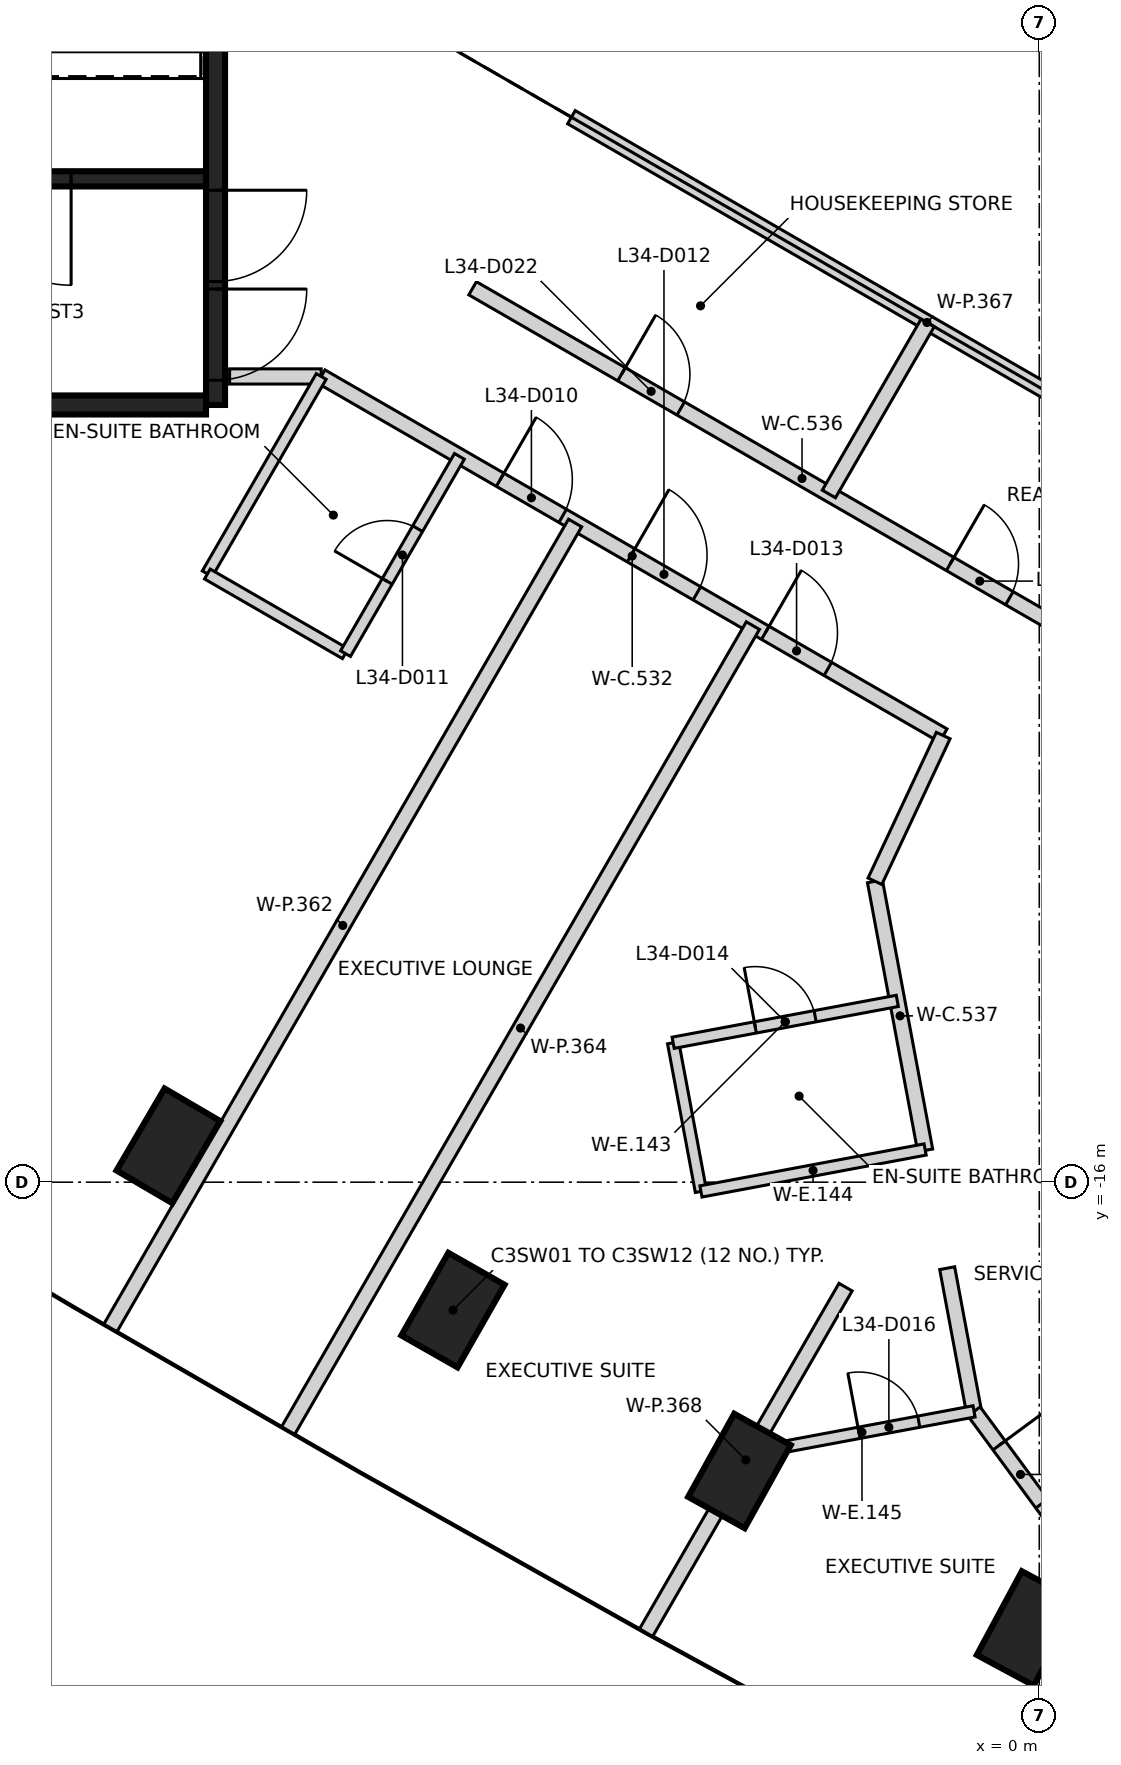
"""IFC4 building model, lengths in metres.
Left out: names, types, materials, properties, quantities, classifications, styles, units other than length and angle.
Written with IfcOpenShell. Run it as: python <this file> out.ifc"""

import sys

from ifc_helpers import new_model, si_unit, direction, frame, frame_2d, origin, origin_2d, place, context, subcontext, project, spatial, rectangle, extrude, element, fill, save


model = new_model("IFC4")
c1 = context("Model", 3, precision=1e-05, world=origin(), true_north=direction((0.0, 1.0)))
c2 = subcontext(c1, "Body", "Model", "MODEL_VIEW")
j1 = project(units=[si_unit("LENGTHUNIT", "METRE"), si_unit("PLANEANGLEUNIT", "RADIAN")], contexts=[c1])
p1 = place(None, origin())
s1 = spatial("IfcSite", under=j1, at=p1, CompositionType="ELEMENT")
p2 = place(p1, origin())
s2 = spatial("IfcBuilding", under=s1, at=p2, CompositionType="ELEMENT")
p3 = place(p2, frame((0.0, 0.0, 139.6)))
s3 = spatial("IfcBuildingStorey", under=s2, at=p3, CompositionType="ELEMENT", Elevation=139.6)
for number, where, z_axis, x_axis in (
    (1, (-11.457, -15.522, -0.4), (0.0, 0.0, 1.0), (0.505, 0.863, 0.0)),
    (2, (-7.714, -17.683, -0.4), (0.0, 0.0, 1.0), (0.495, 0.869, 0.0)),
    (3, (-3.945, -19.8, -0.4), (0.0, 0.0, 1.0), (0.485, 0.875, 0.0)),
    (4, (-0.151, -21.871, -0.4), (0.0, 0.0, 1.0), (0.474, 0.881, 0.0)),
):
    element("IfcColumn", number, at=place(p3, frame(where, z_axis=z_axis, x_axis=x_axis)), inside=s3, PredefinedType="COLUMN", context=c2, shape_type="SweptSolid", body=[
        extrude(rectangle(XDim=1.25, YDim=0.85, at=origin_2d()), origin(), (0.0, 0.0, 1.0), 3.6),
    ])
p4 = place(p3, frame((-10.837, 5.775, 0.0), z_axis=(0.0, 0.0, 1.0), x_axis=(0.0, -1.0, 0.0)))
e5 = element("IfcWall", 5, at=p4, inside=s3, PredefinedType="SHEAR", context=c2, shape_type="SweptSolid", body=[
    extrude(rectangle(XDim=11.55, YDim=0.25, at=frame_2d((5.775, 0.0))), origin(), (0.0, 0.0, 1.0), 3.2),
])
p5 = place(p4, frame((10.025, 0.0, 0.0)))
e6 = element("IfcOpeningElement", 6, at=p5, cuts=e5, PredefinedType="OPENING", context=c2, shape_type="SweptSolid", body=[
    extrude(rectangle(XDim=1.2, YDim=2.1, at=frame_2d((0.6, 1.05))), frame((0.0, 0.135, 0.0), z_axis=(0.0, -1.0, 0.0), x_axis=(1.0, 0.0, 0.0)), (0.0, 0.0, 1.0), 0.27),
])
p6 = place(p4, frame((8.725, 0.0, 0.0)))
e7 = element("IfcOpeningElement", 7, at=p6, cuts=e5, PredefinedType="OPENING", context=c2, shape_type="SweptSolid", body=[
    extrude(rectangle(XDim=1.2, YDim=2.1, at=frame_2d((0.6, 1.05))), frame((0.0, 0.135, 0.0), z_axis=(0.0, -1.0, 0.0), x_axis=(1.0, 0.0, 0.0)), (0.0, 0.0, 1.0), 0.27),
])
p7 = place(p3, frame((-10.963, -5.775, 0.0), z_axis=(0.0, 0.0, 1.0), x_axis=(-1.0, 0.0, 0.0)))
e8 = element("IfcWall", 8, at=p7, inside=s3, PredefinedType="SHEAR", context=c2, shape_type="SweptSolid", body=[
    extrude(rectangle(XDim=5.225, YDim=0.25, at=frame_2d((2.612, 0.0))), origin(), (0.0, 0.0, 1.0), 3.2),
])
p8 = place(p3, frame((-10.963, -2.8, 0.0), z_axis=(0.0, 0.0, 1.0), x_axis=(-1.0, 0.0, 0.0)))
e9 = element("IfcWall", 9, at=p8, inside=s3, PredefinedType="SHEAR", context=c2, shape_type="SweptSolid", body=[
    extrude(rectangle(XDim=5.098, YDim=0.2, at=frame_2d((2.549, 0.0))), origin(), (0.0, 0.0, 1.0), 3.2),
])
p9 = place(p8, frame((1.774, 0.0, 0.0)))
e10 = element("IfcOpeningElement", 10, at=p9, cuts=e9, PredefinedType="OPENING", context=c2, shape_type="SweptSolid", body=[
    extrude(rectangle(XDim=1.4, YDim=2.1, at=frame_2d((0.7, 1.05))), frame((0.0, 0.11, 0.0), z_axis=(0.0, -1.0, 0.0), x_axis=(1.0, 0.0, 0.0)), (0.0, 0.0, 1.0), 0.22),
])
p10 = place(p3, frame((-10.652, -5.4, 0.0), z_axis=(0.0, 0.0, 1.0), x_axis=(1.0, 0.0, 0.0)))
e11 = element("IfcWall", 11, at=p10, inside=s3, PredefinedType="PARTITIONING", context=c2, shape_type="SweptSolid", body=[
    extrude(rectangle(XDim=1.205, YDim=0.2, at=frame_2d((0.603, 0.0))), origin(), (0.0, 0.0, 1.0), 3.2),
])
p11 = place(p3, frame((-9.447, -5.4, 0.0), z_axis=(0.0, 0.0, 1.0), x_axis=(0.866101262146, -0.49986858644, 0.0)))
e12 = element("IfcWall", 12, at=p11, inside=s3, PredefinedType="PARTITIONING", context=c2, shape_type="SweptSolid", body=[
    extrude(rectangle(XDim=9.449, YDim=0.2, at=frame_2d((4.724, 0.0))), origin(), (0.0, 0.0, 1.0), 3.2),
])
p12 = place(p11, frame((2.718, 0.0, 0.0)))
e13 = element("IfcOpeningElement", 13, at=p12, cuts=e12, PredefinedType="OPENING", context=c2, shape_type="SweptSolid", body=[
    extrude(rectangle(XDim=0.95, YDim=2.1, at=frame_2d((0.475, 1.05))), frame((0.0, 0.11, 0.0), z_axis=(0.0, -1.0, 0.0), x_axis=(1.0, 0.0, 0.0)), (0.0, 0.0, 1.0), 0.22),
])
p13 = place(p11, frame((4.707, 0.0, 0.0)))
e14 = element("IfcOpeningElement", 14, at=p13, cuts=e12, PredefinedType="OPENING", context=c2, shape_type="SweptSolid", body=[
    extrude(rectangle(XDim=1.0, YDim=2.1, at=frame_2d((0.5, 1.05))), frame((0.0, 0.11, 0.0), z_axis=(0.0, -1.0, 0.0), x_axis=(1.0, 0.0, 0.0)), (0.0, 0.0, 1.0), 0.22),
])
p14 = place(p11, frame((6.746, 0.0, 0.0)))
e15 = element("IfcOpeningElement", 15, at=p14, cuts=e12, PredefinedType="OPENING", context=c2, shape_type="SweptSolid", body=[
    extrude(rectangle(XDim=0.95, YDim=2.1, at=frame_2d((0.475, 1.05))), frame((0.0, 0.11, 0.0), z_axis=(0.0, -1.0, 0.0), x_axis=(1.0, 0.0, 0.0)), (0.0, 0.0, 1.0), 0.22),
])
p15 = place(p3, frame((-7.455, -4.24, 0.0), z_axis=(0.0, 0.0, 1.0), x_axis=(0.866015783746, -0.500016662025, 0.0)))
e16 = element("IfcWall", 16, at=p15, inside=s3, PredefinedType="PARTITIONING", context=c2, shape_type="SweptSolid", body=[
    extrude(rectangle(XDim=10.009, YDim=0.2, at=frame_2d((5.004, 0.0))), origin(), (0.0, 0.0, 1.0), 3.2),
])
p16 = place(p15, frame((2.262, 0.0, 0.0)))
e17 = element("IfcOpeningElement", 17, at=p16, cuts=e16, PredefinedType="OPENING", context=c2, shape_type="SweptSolid", body=[
    extrude(rectangle(XDim=0.9, YDim=2.1, at=frame_2d((0.45, 1.05))), frame((0.0, 0.11, 0.0), z_axis=(0.0, -1.0, 0.0), x_axis=(1.0, 0.0, 0.0)), (0.0, 0.0, 1.0), 0.22),
])
p17 = place(p15, frame((7.254, 0.0, 0.0)))
e18 = element("IfcOpeningElement", 18, at=p17, cuts=e16, PredefinedType="OPENING", context=c2, shape_type="SweptSolid", body=[
    extrude(rectangle(XDim=0.9, YDim=2.1, at=frame_2d((0.45, 1.05))), frame((0.0, 0.11, 0.0), z_axis=(0.0, -1.0, 0.0), x_axis=(1.0, 0.0, 0.0)), (0.0, 0.0, 1.0), 0.22),
])
p18 = place(p3, frame((-2.162, -12.042, 0.0), z_axis=(0.0, 0.0, 1.0), x_axis=(0.183572226488, -0.983006224631, 0.0)))
e19 = element("IfcWall", 19, at=p18, inside=s3, PredefinedType="PARTITIONING", context=c2, shape_type="SweptSolid", body=[
    extrude(rectangle(XDim=3.602, YDim=0.2, at=frame_2d((1.801, 0.0))), origin(), (0.0, 0.0, 1.0), 3.2),
])
p19 = place(p3, frame((-2.162, -12.041, 0.0), z_axis=(0.0, 0.0, 1.0), x_axis=(0.424280226728, 0.905530943264, 0.0)))
e20 = element("IfcWall", 20, at=p19, inside=s3, PredefinedType="PARTITIONING", context=c2, shape_type="SweptSolid", body=[
    extrude(rectangle(XDim=2.117, YDim=0.2, at=frame_2d((1.059, 0.0))), origin(), (0.0, 0.0, 1.0), 3.2),
])
p20 = place(p3, frame((-1.212, -17.131, 0.0), z_axis=(0.0, 0.0, 1.0), x_axis=(0.183680924698, -0.982985919483, 0.0)))
e21 = element("IfcWall", 21, at=p20, inside=s3, PredefinedType="PARTITIONING", context=c2, shape_type="SweptSolid", body=[
    extrude(rectangle(XDim=1.917, YDim=0.2, at=frame_2d((0.958, 0.0))), origin(), (0.0, 0.0, 1.0), 3.2),
])
p21 = place(p3, frame((-0.858, -19.016, 0.0), z_axis=(0.0, 0.0, 1.0), x_axis=(0.593123867414, -0.805111220829, 0.0)))
e22 = element("IfcWall", 22, at=p21, inside=s3, PredefinedType="PARTITIONING", context=c2, shape_type="SweptSolid", body=[
    extrude(rectangle(XDim=2.77, YDim=0.2, at=frame_2d((1.385, 0.0))), origin(), (0.0, 0.0, 1.0), 3.2),
])
p22 = place(p21, frame((0.555, 0.0, 0.0)))
e23 = element("IfcOpeningElement", 23, at=p22, cuts=e22, PredefinedType="OPENING", context=c2, shape_type="SweptSolid", body=[
    extrude(rectangle(XDim=0.95, YDim=2.1, at=frame_2d((0.475, 1.05))), frame((0.0, 0.11, 0.0), z_axis=(0.0, -1.0, 0.0), x_axis=(1.0, 0.0, 0.0)), (0.0, 0.0, 1.0), 0.22),
])
p23 = place(p3, frame((-12.22, -17.917, 0.0), z_axis=(0.0, 0.0, 1.0), x_axis=(0.499963860175, 0.866046268117, 0.0)))
e24 = element("IfcWall", 24, at=p23, inside=s3, PredefinedType="PARTITIONING", context=c2, shape_type="SweptSolid", body=[
    extrude(rectangle(XDim=12.227, YDim=0.2, at=frame_2d((6.114, 0.0))), origin(), (0.0, 0.0, 1.0), 2.3),
])
p24 = place(p3, frame((-9.882, -19.267, 0.0), z_axis=(0.0, 0.0, 1.0), x_axis=(0.499993811829, 0.866028976497, 0.0)))
e25 = element("IfcWall", 25, at=p24, inside=s3, PredefinedType="PARTITIONING", context=c2, shape_type="SweptSolid", body=[
    extrude(rectangle(XDim=12.227, YDim=0.2, at=frame_2d((6.114, 0.0))), origin(), (0.0, 0.0, 1.0), 2.3),
])
p25 = place(p3, frame((-6.155, -1.989, 0.0), z_axis=(0.0, 0.0, 1.0), x_axis=(0.866009062299, -0.500028303215, 0.0)))
e26 = element("IfcWall", 26, at=p25, inside=s3, PredefinedType="PARTITIONING", context=c2, shape_type="SweptSolid", body=[
    extrude(rectangle(XDim=10.802, YDim=0.2, at=frame_2d((5.401, 0.0))), origin(), (0.0, 0.0, 1.0), 2.3),
])
p26 = place(p3, frame((-5.173, -21.926, 0.0), z_axis=(0.0, 0.0, 1.0), x_axis=(0.499941227542, 0.86605933342, 0.0)))
e27 = element("IfcWall", 27, at=p26, inside=s3, PredefinedType="PARTITIONING", context=c2, shape_type="SweptSolid", body=[
    extrude(rectangle(XDim=5.249, YDim=0.2, at=frame_2d((2.625, 0.0))), origin(), (0.0, 0.0, 1.0), 3.2),
])
p27 = place(p3, frame((-2.768, -6.946, 0.0), z_axis=(0.0, 0.0, 1.0), x_axis=(0.500017832597, 0.866015107885, 0.0)))
e28 = element("IfcWall", 28, at=p27, inside=s3, PredefinedType="PARTITIONING", context=c2, shape_type="SweptSolid", body=[
    extrude(rectangle(XDim=2.6, YDim=0.2, at=frame_2d((1.3, 0.0))), origin(), (0.0, 0.0, 1.0), 2.3),
])
p28 = place(p3, frame((-0.425, -24.505, 0.0), z_axis=(0.0, 0.0, 1.0), x_axis=(0.499915194772, 0.86607436057, 0.0)))
e29 = element("IfcWall", 29, at=p28, inside=s3, PredefinedType="PARTITIONING", context=c2, shape_type="SweptSolid", body=[
    extrude(rectangle(XDim=2.997, YDim=0.2, at=frame_2d((1.499, 0.0))), origin(), (0.0, 0.0, 1.0), 2.3),
])
p29 = place(p3, frame((-10.946, -7.996, 0.0), z_axis=(0.0, 0.0, 1.0), x_axis=(0.500027927039, 0.866009279501, 0.0)))
e30 = element("IfcWall", 30, at=p29, inside=s3, PredefinedType="PARTITIONING", context=c2, shape_type="SweptSolid", body=[
    extrude(rectangle(XDim=2.998, YDim=0.15, at=frame_2d((1.499, 0.0))), origin(), (0.0, 0.0, 1.0), 3.2),
])
p30 = place(p3, frame((-10.945, -7.999, 0.0), z_axis=(0.0, 0.0, 1.0), x_axis=(0.866005190944, -0.500035008033, 0.0)))
e31 = element("IfcWall", 31, at=p30, inside=s3, PredefinedType="PARTITIONING", context=c2, shape_type="SweptSolid", body=[
    extrude(rectangle(XDim=2.096, YDim=0.15, at=frame_2d((1.048, 0.0))), origin(), (0.0, 0.0, 1.0), 3.2),
])
p31 = place(p3, frame((-9.127, -9.046, 0.0), z_axis=(0.0, 0.0, 1.0), x_axis=(0.499959910729, 0.866048548099, 0.0)))
e32 = element("IfcWall", 32, at=p31, inside=s3, PredefinedType="PARTITIONING", context=c2, shape_type="SweptSolid", body=[
    extrude(rectangle(XDim=2.996, YDim=0.15, at=frame_2d((1.498, 0.0))), origin(), (0.0, 0.0, 1.0), 3.2),
])
p32 = place(p31, frame((1.098, 0.0, 0.0)))
e33 = element("IfcOpeningElement", 33, at=p32, cuts=e32, PredefinedType="OPENING", context=c2, shape_type="SweptSolid", body=[
    extrude(rectangle(XDim=0.8, YDim=2.1, at=frame_2d((0.4, 1.05))), frame((0.0, 0.085, 0.0), z_axis=(0.0, -1.0, 0.0), x_axis=(1.0, 0.0, 0.0)), (0.0, 0.0, 1.0), 0.17),
])
p33 = place(p3, frame((-4.817, -14.166, 0.0), z_axis=(0.0, 0.0, 1.0), x_axis=(0.183903339385, -0.982944332993, 0.0)))
e34 = element("IfcWall", 34, at=p33, inside=s3, PredefinedType="PARTITIONING", context=c2, shape_type="SweptSolid", body=[
    extrude(rectangle(XDim=1.99, YDim=0.15, at=frame_2d((0.995, 0.0))), origin(), (0.0, 0.0, 1.0), 3.2),
])
p34 = place(p3, frame((-4.817, -14.166, 0.0), z_axis=(0.0, 0.0, 1.0), x_axis=(0.982987155193, 0.183674311555, 0.0)))
e35 = element("IfcWall", 35, at=p34, inside=s3, PredefinedType="PARTITIONING", context=c2, shape_type="SweptSolid", body=[
    extrude(rectangle(XDim=3.0, YDim=0.15, at=frame_2d((1.5, 0.0))), origin(), (0.0, 0.0, 1.0), 3.2),
])
p35 = place(p34, frame((1.1, 0.0, 0.0)))
e36 = element("IfcOpeningElement", 36, at=p35, cuts=e35, PredefinedType="OPENING", context=c2, shape_type="SweptSolid", body=[
    extrude(rectangle(XDim=0.8, YDim=2.1, at=frame_2d((0.4, 1.05))), frame((0.0, 0.085, 0.0), z_axis=(0.0, -1.0, 0.0), x_axis=(1.0, 0.0, 0.0)), (0.0, 0.0, 1.0), 0.17),
])
p36 = place(p3, frame((-4.451, -16.122, 0.0), z_axis=(0.0, 0.0, 1.0), x_axis=(0.982928336035, 0.18398882091, 0.0)))
e37 = element("IfcWall", 37, at=p36, inside=s3, PredefinedType="PARTITIONING", context=c2, shape_type="SweptSolid", body=[
    extrude(rectangle(XDim=3.0, YDim=0.15, at=frame_2d((1.5, 0.0))), origin(), (0.0, 0.0, 1.0), 3.2),
])
p37 = place(p3, frame((-3.807, -19.566, 0.0), z_axis=(0.0, 0.0, 1.0), x_axis=(0.982987155193, 0.183674311555, 0.0)))
e38 = element("IfcWall", 38, at=p37, inside=s3, PredefinedType="PARTITIONING", context=c2, shape_type="SweptSolid", body=[
    extrude(rectangle(XDim=3.0, YDim=0.15, at=frame_2d((1.5, 0.0))), origin(), (0.0, 0.0, 1.0), 3.2),
])
p38 = place(p37, frame((1.46, 0.0, 0.0)))
e39 = element("IfcOpeningElement", 39, at=p38, cuts=e38, PredefinedType="OPENING", context=c2, shape_type="SweptSolid", body=[
    extrude(rectangle(XDim=0.8, YDim=2.1, at=frame_2d((0.4, 1.05))), frame((0.0, 0.085, 0.0), z_axis=(0.0, -1.0, 0.0), x_axis=(1.0, 0.0, 0.0)), (0.0, 0.0, 1.0), 0.17),
])
p39 = place(p5, origin())
e40 = element("IfcDoor", 40, at=p39, inside=s3, OperationType="SINGLE_SWING_LEFT", PredefinedType="DOOR", context=c2, shape_type="SweptSolid", body=[
    extrude(rectangle(XDim=1.2, YDim=2.1, at=frame_2d((0.6, 1.05))), frame((0.0, 0.025, 0.0), z_axis=(0.0, -1.0, 0.0), x_axis=(1.0, 0.0, 0.0)), (0.0, 0.0, 1.0), 0.05),
])
fill(e6, e40)
p40 = place(p6, origin())
e41 = element("IfcDoor", 41, at=p40, inside=s3, OperationType="SINGLE_SWING_RIGHT", PredefinedType="DOOR", context=c2, shape_type="SweptSolid", body=[
    extrude(rectangle(XDim=1.2, YDim=2.1, at=frame_2d((0.6, 1.05))), frame((0.0, 0.025, 0.0), z_axis=(0.0, -1.0, 0.0), x_axis=(1.0, 0.0, 0.0)), (0.0, 0.0, 1.0), 0.05),
])
fill(e7, e41)
p41 = place(p9, origin())
e42 = element("IfcDoor", 42, at=p41, inside=s3, OperationType="SINGLE_SWING_RIGHT", PredefinedType="DOOR", context=c2, shape_type="SweptSolid", body=[
    extrude(rectangle(XDim=1.4, YDim=2.1, at=frame_2d((0.7, 1.05))), frame((0.0, 0.025, 0.0), z_axis=(0.0, -1.0, 0.0), x_axis=(1.0, 0.0, 0.0)), (0.0, 0.0, 1.0), 0.05),
])
fill(e10, e42)
p42 = place(p12, frame((0.95, 0.0, 0.0), z_axis=(0.0, 0.0, 1.0), x_axis=(-1.0, 0.0, 0.0)))
e43 = element("IfcDoor", 43, at=p42, inside=s3, OperationType="SINGLE_SWING_LEFT", PredefinedType="DOOR", context=c2, shape_type="SweptSolid", body=[
    extrude(rectangle(XDim=0.95, YDim=2.1, at=frame_2d((0.475, 1.05))), frame((0.0, 0.025, 0.0), z_axis=(0.0, -1.0, 0.0), x_axis=(1.0, 0.0, 0.0)), (0.0, 0.0, 1.0), 0.05),
])
fill(e13, e43)
p43 = place(p32, origin())
e44 = element("IfcDoor", 44, at=p43, inside=s3, OperationType="SINGLE_SWING_LEFT", PredefinedType="DOOR", context=c2, shape_type="SweptSolid", body=[
    extrude(rectangle(XDim=0.8, YDim=2.1, at=frame_2d((0.4, 1.05))), frame((0.0, 0.025, 0.0), z_axis=(0.0, -1.0, 0.0), x_axis=(1.0, 0.0, 0.0)), (0.0, 0.0, 1.0), 0.05),
])
fill(e33, e44)
p44 = place(p13, frame((1.0, 0.0, 0.0), z_axis=(0.0, 0.0, 1.0), x_axis=(-1.0, 0.0, 0.0)))
e45 = element("IfcDoor", 45, at=p44, inside=s3, OperationType="SINGLE_SWING_LEFT", PredefinedType="DOOR", context=c2, shape_type="SweptSolid", body=[
    extrude(rectangle(XDim=1.0, YDim=2.1, at=frame_2d((0.5, 1.05))), frame((0.0, 0.025, 0.0), z_axis=(0.0, -1.0, 0.0), x_axis=(1.0, 0.0, 0.0)), (0.0, 0.0, 1.0), 0.05),
])
fill(e14, e45)
p45 = place(p14, frame((0.95, 0.0, 0.0), z_axis=(0.0, 0.0, 1.0), x_axis=(-1.0, 0.0, 0.0)))
e46 = element("IfcDoor", 46, at=p45, inside=s3, OperationType="SINGLE_SWING_LEFT", PredefinedType="DOOR", context=c2, shape_type="SweptSolid", body=[
    extrude(rectangle(XDim=0.95, YDim=2.1, at=frame_2d((0.475, 1.05))), frame((0.0, 0.025, 0.0), z_axis=(0.0, -1.0, 0.0), x_axis=(1.0, 0.0, 0.0)), (0.0, 0.0, 1.0), 0.05),
])
fill(e15, e46)
p46 = place(p35, frame((0.8, 0.0, 0.0), z_axis=(0.0, 0.0, 1.0), x_axis=(-1.0, 0.0, 0.0)))
e47 = element("IfcDoor", 47, at=p46, inside=s3, OperationType="SINGLE_SWING_LEFT", PredefinedType="DOOR", context=c2, shape_type="SweptSolid", body=[
    extrude(rectangle(XDim=0.8, YDim=2.1, at=frame_2d((0.4, 1.05))), frame((0.0, 0.025, 0.0), z_axis=(0.0, -1.0, 0.0), x_axis=(1.0, 0.0, 0.0)), (0.0, 0.0, 1.0), 0.05),
])
fill(e36, e47)
p47 = place(p22, frame((0.95, 0.0, 0.0), z_axis=(0.0, 0.0, 1.0), x_axis=(-1.0, 0.0, 0.0)))
e48 = element("IfcDoor", 48, at=p47, inside=s3, OperationType="SINGLE_SWING_LEFT", PredefinedType="DOOR", context=c2, shape_type="SweptSolid", body=[
    extrude(rectangle(XDim=0.95, YDim=2.1, at=frame_2d((0.475, 1.05))), frame((0.0, 0.025, 0.0), z_axis=(0.0, -1.0, 0.0), x_axis=(1.0, 0.0, 0.0)), (0.0, 0.0, 1.0), 0.05),
])
fill(e23, e48)
p48 = place(p38, frame((0.8, 0.0, 0.0), z_axis=(0.0, 0.0, 1.0), x_axis=(-1.0, 0.0, 0.0)))
e49 = element("IfcDoor", 49, at=p48, inside=s3, OperationType="SINGLE_SWING_LEFT", PredefinedType="DOOR", context=c2, shape_type="SweptSolid", body=[
    extrude(rectangle(XDim=0.8, YDim=2.1, at=frame_2d((0.4, 1.05))), frame((0.0, 0.025, 0.0), z_axis=(0.0, -1.0, 0.0), x_axis=(1.0, 0.0, 0.0)), (0.0, 0.0, 1.0), 0.05),
])
fill(e39, e49)
p49 = place(p16, origin())
e50 = element("IfcDoor", 50, at=p49, inside=s3, OperationType="SINGLE_SWING_LEFT", PredefinedType="DOOR", context=c2, shape_type="SweptSolid", body=[
    extrude(rectangle(XDim=0.9, YDim=2.1, at=frame_2d((0.45, 1.05))), frame((0.0, 0.025, 0.0), z_axis=(0.0, -1.0, 0.0), x_axis=(1.0, 0.0, 0.0)), (0.0, 0.0, 1.0), 0.05),
])
fill(e17, e50)
p50 = place(p17, origin())
e51 = element("IfcDoor", 51, at=p50, inside=s3, OperationType="SINGLE_SWING_LEFT", PredefinedType="DOOR", context=c2, shape_type="SweptSolid", body=[
    extrude(rectangle(XDim=0.9, YDim=2.1, at=frame_2d((0.45, 1.05))), frame((0.0, 0.025, 0.0), z_axis=(0.0, -1.0, 0.0), x_axis=(1.0, 0.0, 0.0)), (0.0, 0.0, 1.0), 0.05),
])
fill(e18, e51)
save(model, sys.argv[1])
